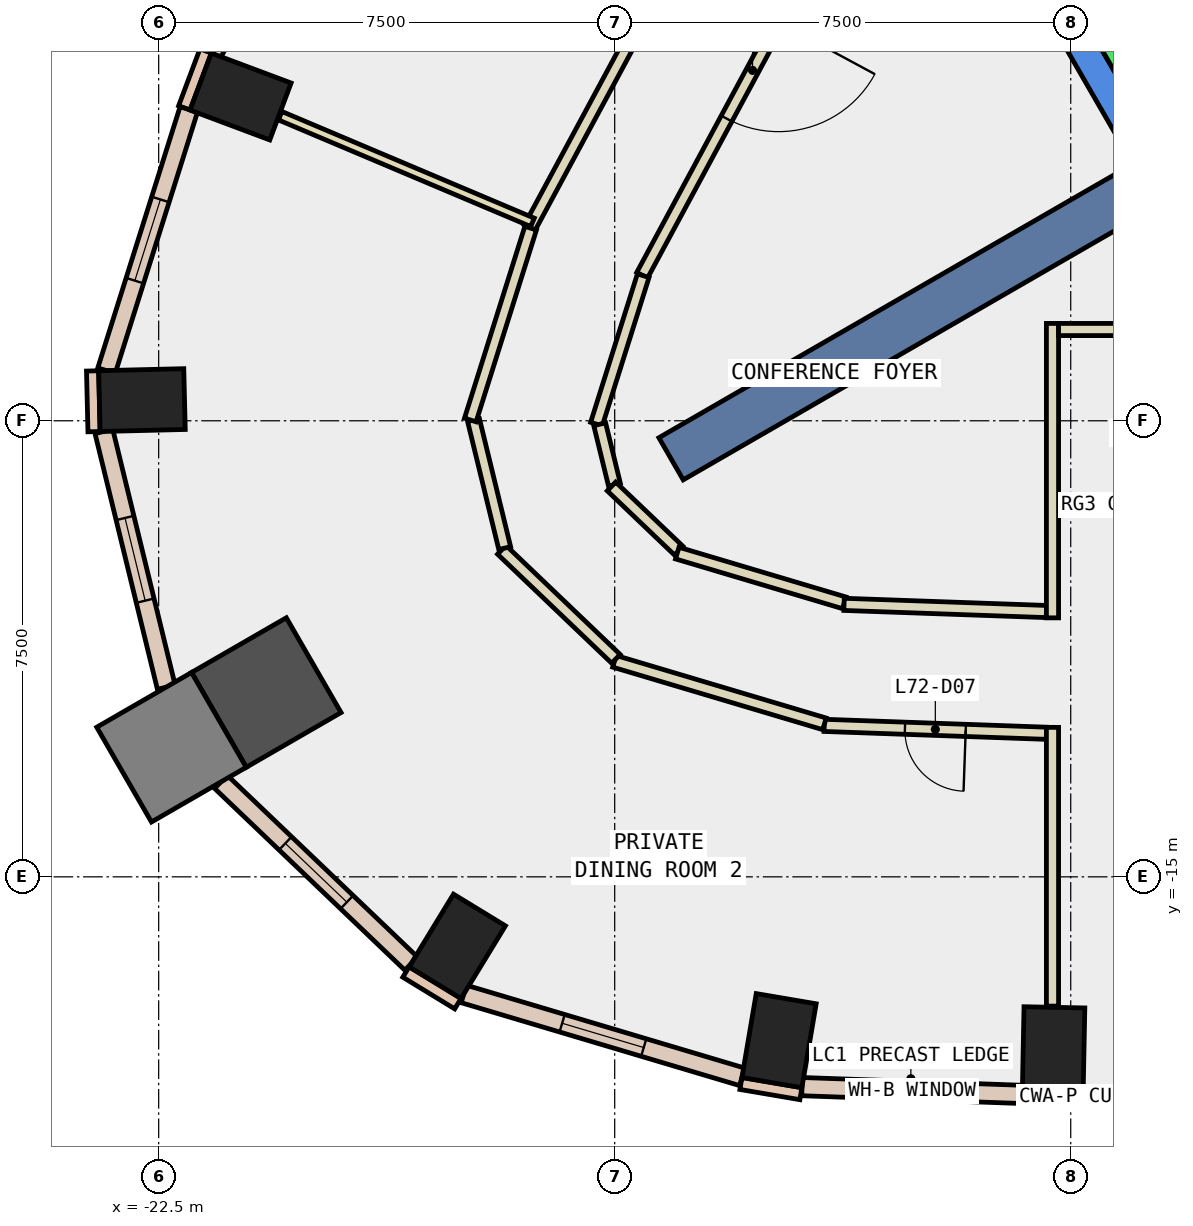
"""IFC4 building model, lengths in metres.
Left out: names, types, materials, properties, quantities, classifications, styles, units other than length and angle.
Written with IfcOpenShell. Run it as: python <this file> out.ifc"""

import sys

from ifc_helpers import new_model, si_unit, direction, frame, frame_2d, origin, origin_2d, place, context, subcontext, project, spatial, polyline, rectangle, outline, extrude, element, fill, save


model = new_model("IFC4")
c1 = context("Model", 3, precision=1e-05, world=origin(), true_north=direction((0.0, 1.0)))
c2 = subcontext(c1, "Body", "Model", "MODEL_VIEW")
j1 = project(units=[si_unit("LENGTHUNIT", "METRE"), si_unit("PLANEANGLEUNIT", "RADIAN")], contexts=[c1])
p1 = place(None, origin())
s1 = spatial("IfcSite", under=j1, at=p1, CompositionType="ELEMENT")
p2 = place(p1, origin())
s2 = spatial("IfcBuilding", under=s1, at=p2, CompositionType="ELEMENT")
p3 = place(p2, frame((0.0, 0.0, 308.0)))
s3 = spatial("IfcBuildingStorey", under=s2, at=p3, CompositionType="ELEMENT", Elevation=308.0)
for number, where, z_axis, x_axis in (
    (1, (-12.297, -17.694, -0.34), (0.0, 0.0, 1.0), (-0.986, 0.168, 0.0)),
    (2, (-7.782, -17.846, -0.34), (0.0, 0.0, 1.0), (-1.0, 0.02, 0.0)),
    (3, (-21.153, -2.168, -0.34), (0.0, 0.0, 1.0), (0.351, 0.936, 0.0)),
    (4, (-22.775, -7.16, -0.34), (0.0, 0.0, 1.0), (-0.024, 1.0, 0.0)),
):
    element("IfcColumn", number, at=place(p3, frame(where, z_axis=z_axis, x_axis=x_axis)), inside=s3, PredefinedType="COLUMN", context=c2, shape_type="SweptSolid", body=[
        extrude(rectangle(XDim=1.0, YDim=1.4, at=origin_2d()), origin(), (0.0, 0.0, 1.0), 3.6),
    ])
p4 = place(p3, frame((-20.73, -11.969, -0.34), z_axis=(0.0, 0.0, 1.0), x_axis=(0.866025403784, 0.5, 0.0)))
e5 = element("IfcColumn", 5, at=p4, inside=s3, PredefinedType="COLUMN", context=c2, shape_type="SweptSolid", body=[
    extrude(rectangle(XDim=1.8, YDim=1.8, at=origin_2d()), origin(), (0.0, 0.0, 1.0), 3.6),
])
p5 = place(p3, frame((-17.589, -16.143, -0.34), z_axis=(0.0, 0.0, 1.0), x_axis=(-0.853650808213, 0.520845752251, 0.0)))
e6 = element("IfcColumn", 6, at=p5, inside=s3, PredefinedType="COLUMN", context=c2, shape_type="SweptSolid", body=[
    extrude(rectangle(XDim=1.0, YDim=1.4, at=origin_2d()), origin(), (0.0, 0.0, 1.0), 3.6),
])
p6 = place(p3, frame((-22.289, -12.869, -0.34), z_axis=(0.0, 0.0, 1.0), x_axis=(0.866025403784, 0.5, 0.0)))
e7 = element("IfcColumn", 7, at=p6, inside=s3, PredefinedType="COLUMN", context=c2, shape_type="SweptSolid", body=[
    extrude(rectangle(XDim=1.8, YDim=1.8, at=origin_2d()), origin(), (0.0, 0.0, 1.0), 3.6),
])
p7 = place(p3, frame((0.0, 0.0, -0.34)))
e8 = element("IfcWall", 8, at=p7, inside=s3, PredefinedType="SHEAR", context=c2, shape_type="SweptSolid", body=[
    extrude(outline(polyline([(-9.815, 2.5), (-4.907, -6.0), (-4.619, -5.5), (-9.238, 2.5), (-9.815, 2.5)])), origin(), (0.0, 0.0, 1.0), 3.6),
])
p8 = place(p3, frame((-6.279, -3.625, -0.34), z_axis=(0.0, 0.0, 1.0), x_axis=(-0.866017533419, -0.500013631625, 0.0)))
e9 = element("IfcWall", 9, at=p8, inside=s3, PredefinedType="SHEAR", context=c2, shape_type="SweptSolid", body=[
    extrude(rectangle(XDim=9.0, YDim=0.8, at=frame_2d((4.5, 0.0))), origin(), (0.0, 0.0, 1.0), 3.6),
])
p9 = place(p3, frame((-21.727, -1.419, 0.0), z_axis=(0.0, 0.0, 1.0), x_axis=(-0.350962844851, -0.936389385637, 0.0)))
e10 = element("IfcWall", 10, at=p9, inside=s3, PredefinedType="STANDARD", context=c2, shape_type="SweptSolid", body=[
    extrude(rectangle(XDim=1.0, YDim=0.2, at=frame_2d((0.5, 0.0))), origin(), (0.0, 0.0, 1.0), 3.26),
])
for number, where, z_axis, x_axis in (
    (11, (-12.924, -18.398, 0.0), (0.0, 0.0, 1.0), (0.986, -0.168, 0.0)),
    (12, (-8.298, -18.636, 0.0), (0.0, 0.0, 1.0), (1.0, -0.02, 0.0)),
):
    element("IfcWall", number, at=place(p3, frame(where, z_axis=z_axis, x_axis=x_axis)), inside=s3, PredefinedType="STANDARD", context=c2, shape_type="SweptSolid", body=[
        extrude(rectangle(XDim=1.0, YDim=0.2, at=frame_2d((0.5, 0.0))), origin(), (0.0, 0.0, 1.0), 3.26),
    ])
p10 = place(p3, frame((-23.587, -6.68, 0.0), z_axis=(0.0, 0.0, 1.0), x_axis=(0.023942303888, -0.999713341956, 0.0)))
e13 = element("IfcWall", 13, at=p10, inside=s3, PredefinedType="STANDARD", context=c2, shape_type="SweptSolid", body=[
    extrude(rectangle(XDim=0.999, YDim=0.2, at=frame_2d((0.5, 0.0))), origin(), (0.0, 0.0, 1.0), 3.26),
])
p11 = place(p3, frame((-18.433, -16.565, 0.0), z_axis=(0.0, 0.0, 1.0), x_axis=(0.853679739553, -0.520798331677, 0.0)))
e14 = element("IfcWall", 14, at=p11, inside=s3, PredefinedType="STANDARD", context=c2, shape_type="SweptSolid", body=[
    extrude(rectangle(XDim=1.0, YDim=0.2, at=frame_2d((0.5, 0.0))), origin(), (0.0, 0.0, 1.0), 3.26),
])
p12 = place(p3, frame((-11.919, -18.45, 0.0), z_axis=(0.0, 0.0, 1.0), x_axis=(0.999377185233, -0.035287981473, 0.0)))
e15 = element("IfcWall", 15, at=p12, inside=s3, PredefinedType="STANDARD", context=c2, shape_type="SweptSolid", body=[
    extrude(rectangle(XDim=3.625, YDim=0.3, at=frame_2d((1.812, 0.0))), origin(), (0.0, 0.0, 1.0), 3.26),
])
p13 = place(p12, frame((1.113, 0.0, 0.9)))
e16 = element("IfcOpeningElement", 16, at=p13, cuts=e15, PredefinedType="OPENING", context=c2, shape_type="SweptSolid", body=[
    extrude(rectangle(XDim=1.4, YDim=2.0, at=frame_2d((0.7, 1.0))), frame((0.0, 0.16, 0.0), z_axis=(0.0, -1.0, 0.0), x_axis=(1.0, 0.0, 0.0)), (0.0, 0.0, 1.0), 0.32),
])
p14 = place(p3, frame((-18.097, 5.066, 0.0), z_axis=(0.0, 0.0, 1.0), x_axis=(-0.474421773145, -0.880297666228, 0.0)))
e17 = element("IfcWall", 17, at=p14, inside=s3, PredefinedType="STANDARD", context=c2, shape_type="SweptSolid", body=[
    extrude(rectangle(XDim=7.416, YDim=0.3, at=frame_2d((3.708, 0.0))), origin(), (0.0, 0.0, 1.0), 3.26),
])
p15 = place(p14, frame((0.754, 0.0, 0.9)))
e18 = element("IfcOpeningElement", 18, at=p15, cuts=e17, PredefinedType="OPENING", context=c2, shape_type="SweptSolid", body=[
    extrude(rectangle(XDim=2.2, YDim=2.0, at=frame_2d((1.1, 1.0))), frame((0.0, 0.16, 0.0), z_axis=(0.0, -1.0, 0.0), x_axis=(1.0, 0.0, 0.0)), (0.0, 0.0, 1.0), 0.32),
])
p16 = place(p14, frame((4.462, 0.0, 0.9)))
e19 = element("IfcOpeningElement", 19, at=p16, cuts=e17, PredefinedType="OPENING", context=c2, shape_type="SweptSolid", body=[
    extrude(rectangle(XDim=2.2, YDim=2.0, at=frame_2d((1.1, 1.0))), frame((0.0, 0.16, 0.0), z_axis=(0.0, -1.0, 0.0), x_axis=(1.0, 0.0, 0.0)), (0.0, 0.0, 1.0), 0.32),
])
p17 = place(p3, frame((-22.005, -2.381, 0.0), z_axis=(0.0, 0.0, 1.0), x_axis=(-0.300534385574, -0.953770980418, 0.0)))
e20 = element("IfcWall", 20, at=p17, inside=s3, PredefinedType="STANDARD", context=c2, shape_type="SweptSolid", body=[
    extrude(rectangle(XDim=4.502, YDim=0.3, at=frame_2d((2.251, 0.0))), origin(), (0.0, 0.0, 1.0), 3.26),
])
p18 = place(p17, frame((1.551, 0.0, 0.9)))
e21 = element("IfcOpeningElement", 21, at=p18, cuts=e20, PredefinedType="OPENING", context=c2, shape_type="SweptSolid", body=[
    extrude(rectangle(XDim=1.4, YDim=2.0, at=frame_2d((0.7, 1.0))), frame((0.0, 0.16, 0.0), z_axis=(0.0, -1.0, 0.0), x_axis=(1.0, 0.0, 0.0)), (0.0, 0.0, 1.0), 0.32),
])
p19 = place(p3, frame((-23.401, -7.675, 0.0), z_axis=(0.0, 0.0, 1.0), x_axis=(0.236958776561, -0.971519705519, 0.0)))
e22 = element("IfcWall", 22, at=p19, inside=s3, PredefinedType="STANDARD", context=c2, shape_type="SweptSolid", body=[
    extrude(rectangle(XDim=4.329, YDim=0.3, at=frame_2d((2.165, 0.0))), origin(), (0.0, 0.0, 1.0), 3.26),
])
p20 = place(p19, frame((1.465, 0.0, 0.9)))
e23 = element("IfcOpeningElement", 23, at=p20, cuts=e22, PredefinedType="OPENING", context=c2, shape_type="SweptSolid", body=[
    extrude(rectangle(XDim=1.4, YDim=2.0, at=frame_2d((0.7, 1.0))), frame((0.0, 0.16, 0.0), z_axis=(0.0, -1.0, 0.0), x_axis=(1.0, 0.0, 0.0)), (0.0, 0.0, 1.0), 0.32),
])
p21 = place(p3, frame((-21.476, -13.438, 0.0), z_axis=(0.0, 0.0, 1.0), x_axis=(0.723113419412, -0.690729312152, 0.0)))
e24 = element("IfcWall", 24, at=p21, inside=s3, PredefinedType="STANDARD", context=c2, shape_type="SweptSolid", body=[
    extrude(rectangle(XDim=4.327, YDim=0.3, at=frame_2d((2.164, 0.0))), origin(), (0.0, 0.0, 1.0), 3.26),
])
p22 = place(p21, frame((1.464, 0.0, 0.9)))
e25 = element("IfcOpeningElement", 25, at=p22, cuts=e24, PredefinedType="OPENING", context=c2, shape_type="SweptSolid", body=[
    extrude(rectangle(XDim=1.4, YDim=2.0, at=frame_2d((0.7, 1.0))), frame((0.0, 0.16, 0.0), z_axis=(0.0, -1.0, 0.0), x_axis=(1.0, 0.0, 0.0)), (0.0, 0.0, 1.0), 0.32),
])
p23 = place(p3, frame((-17.482, -16.926, 0.0), z_axis=(0.0, 0.0, 1.0), x_axis=(0.95841929886, -0.285363711031, 0.0)))
e26 = element("IfcWall", 26, at=p23, inside=s3, PredefinedType="STANDARD", context=c2, shape_type="SweptSolid", body=[
    extrude(rectangle(XDim=4.777, YDim=0.3, at=frame_2d((2.388, 0.0))), origin(), (0.0, 0.0, 1.0), 3.26),
])
p24 = place(p23, frame((1.688, 0.0, 0.9)))
e27 = element("IfcOpeningElement", 27, at=p24, cuts=e26, PredefinedType="OPENING", context=c2, shape_type="SweptSolid", body=[
    extrude(rectangle(XDim=1.4, YDim=2.0, at=frame_2d((0.7, 1.0))), frame((0.0, 0.16, 0.0), z_axis=(0.0, -1.0, 0.0), x_axis=(1.0, 0.0, 0.0)), (0.0, 0.0, 1.0), 0.32),
])
p25 = place(p3, frame((-10.917, 1.631, 0.0), z_axis=(0.0, 0.0, 1.0), x_axis=(-0.47449538478, -0.880257990491, 0.0)))
e28 = element("IfcWall", 28, at=p25, inside=s3, PredefinedType="PARTITIONING", context=c2, shape_type="SweptSolid", body=[
    extrude(rectangle(XDim=7.655, YDim=0.2, at=frame_2d((3.827, 0.0))), origin(), (0.0, 0.0, 1.0), 3.26),
])
p26 = place(p25, frame((2.927, 0.0, 0.0)))
e29 = element("IfcOpeningElement", 29, at=p26, cuts=e28, PredefinedType="OPENING", context=c2, shape_type="SweptSolid", body=[
    extrude(rectangle(XDim=1.8, YDim=2.1, at=frame_2d((0.9, 1.05))), frame((0.0, 0.11, 0.0), z_axis=(0.0, -1.0, 0.0), x_axis=(1.0, 0.0, 0.0)), (0.0, 0.0, 1.0), 0.22),
])
p27 = place(p3, frame((-14.531, -5.114, 0.0), z_axis=(0.0, 0.0, 1.0), x_axis=(-0.300501248013, -0.953781421471, 0.0)))
e30 = element("IfcWall", 30, at=p27, inside=s3, PredefinedType="PARTITIONING", context=c2, shape_type="SweptSolid", body=[
    extrude(rectangle(XDim=2.559, YDim=0.2, at=frame_2d((1.28, 0.0))), origin(), (0.0, 0.0, 1.0), 3.26),
])
p28 = place(p3, frame((-15.247, -7.557, 0.0), z_axis=(0.0, 0.0, 1.0), x_axis=(0.237373129266, -0.971418549083, 0.0)))
e31 = element("IfcWall", 31, at=p28, inside=s3, PredefinedType="PARTITIONING", context=c2, shape_type="SweptSolid", body=[
    extrude(rectangle(XDim=1.024, YDim=0.2, at=frame_2d((0.512, 0.0))), origin(), (0.0, 0.0, 1.0), 3.26),
])
p29 = place(p3, frame((-15.053, -8.58, 0.0), z_axis=(0.0, 0.0, 1.0), x_axis=(0.723283043556, -0.690551691696, 0.0)))
e32 = element("IfcWall", 32, at=p29, inside=s3, PredefinedType="PARTITIONING", context=c2, shape_type="SweptSolid", body=[
    extrude(rectangle(XDim=1.529, YDim=0.2, at=frame_2d((0.765, 0.0))), origin(), (0.0, 0.0, 1.0), 3.26),
])
p30 = place(p3, frame((-13.971, -9.676, 0.0), z_axis=(0.0, 0.0, 1.0), x_axis=(0.958417413979, -0.285370041492, 0.0)))
e33 = element("IfcWall", 33, at=p30, inside=s3, PredefinedType="PARTITIONING", context=c2, shape_type="SweptSolid", body=[
    extrude(rectangle(XDim=2.866, YDim=0.2, at=frame_2d((1.433, 0.0))), origin(), (0.0, 0.0, 1.0), 3.26),
])
p31 = place(p3, frame((-11.228, -10.519, 0.0), z_axis=(0.0, 0.0, 1.0), x_axis=(0.999372900517, -0.035409119054, 0.0)))
e34 = element("IfcWall", 34, at=p31, inside=s3, PredefinedType="PARTITIONING", context=c2, shape_type="SweptSolid", body=[
    extrude(rectangle(XDim=3.33, YDim=0.2, at=frame_2d((1.665, 0.0))), origin(), (0.0, 0.0, 1.0), 3.26),
])
p32 = place(p3, frame((-16.399, -4.325, 0.0), z_axis=(0.0, 0.0, 1.0), x_axis=(0.474489967676, 0.880260910512, 0.0)))
e35 = element("IfcWall", 35, at=p32, inside=s3, PredefinedType="PARTITIONING", context=c2, shape_type="SweptSolid", body=[
    extrude(rectangle(XDim=7.948, YDim=0.2, at=frame_2d((3.974, 0.0))), origin(), (0.0, 0.0, 1.0), 3.26),
])
p33 = place(p32, frame((3.474, 0.0, 0.0)))
e36 = element("IfcOpeningElement", 36, at=p33, cuts=e35, PredefinedType="OPENING", context=c2, shape_type="SweptSolid", body=[
    extrude(rectangle(XDim=1.0, YDim=2.1, at=frame_2d((0.5, 1.05))), frame((0.0, 0.11, 0.0), z_axis=(0.0, -1.0, 0.0), x_axis=(1.0, 0.0, 0.0)), (0.0, 0.0, 1.0), 0.22),
])
p34 = place(p3, frame((-7.9, -12.639, 0.0), z_axis=(0.0, 0.0, 1.0), x_axis=(-0.999368879246, 0.035522432268, 0.0)))
e37 = element("IfcWall", 37, at=p34, inside=s3, PredefinedType="PARTITIONING", context=c2, shape_type="SweptSolid", body=[
    extrude(rectangle(XDim=3.656, YDim=0.2, at=frame_2d((1.828, 0.0))), origin(), (0.0, 0.0, 1.0), 3.26),
])
p35 = place(p34, frame((1.328, 0.0, 0.0)))
e38 = element("IfcOpeningElement", 38, at=p35, cuts=e37, PredefinedType="OPENING", context=c2, shape_type="SweptSolid", body=[
    extrude(rectangle(XDim=1.0, YDim=2.1, at=frame_2d((0.5, 1.05))), frame((0.0, 0.11, 0.0), z_axis=(0.0, -1.0, 0.0), x_axis=(1.0, 0.0, 0.0)), (0.0, 0.0, 1.0), 0.22),
])
p36 = place(p3, frame((-11.55, -12.484, 0.0), z_axis=(0.0, 0.0, 1.0), x_axis=(-0.958459796003, 0.285227662485, 0.0)))
e39 = element("IfcWall", 39, at=p36, inside=s3, PredefinedType="PARTITIONING", context=c2, shape_type="SweptSolid", body=[
    extrude(rectangle(XDim=3.604, YDim=0.2, at=frame_2d((1.802, 0.0))), origin(), (0.0, 0.0, 1.0), 3.26),
])
p37 = place(p3, frame((-14.98, -11.415, 0.0), z_axis=(0.0, 0.0, 1.0), x_axis=(-0.723099256445, 0.690744138831, 0.0)))
e40 = element("IfcWall", 40, at=p37, inside=s3, PredefinedType="PARTITIONING", context=c2, shape_type="SweptSolid", body=[
    extrude(rectangle(XDim=2.596, YDim=0.2, at=frame_2d((1.298, 0.0))), origin(), (0.0, 0.0, 1.0), 3.26),
])
p38 = place(p3, frame((-16.809, -9.594, 0.0), z_axis=(0.0, 0.0, 1.0), x_axis=(-0.23664760587, 0.971595548897, 0.0)))
e41 = element("IfcWall", 41, at=p38, inside=s3, PredefinedType="PARTITIONING", context=c2, shape_type="SweptSolid", body=[
    extrude(rectangle(XDim=2.167, YDim=0.2, at=frame_2d((1.084, 0.0))), origin(), (0.0, 0.0, 1.0), 3.26),
])
p39 = place(p3, frame((-17.375, -7.487, 0.0), z_axis=(0.0, 0.0, 1.0), x_axis=(0.300195088058, 0.953877827138, 0.0)))
e42 = element("IfcWall", 42, at=p39, inside=s3, PredefinedType="PARTITIONING", context=c2, shape_type="SweptSolid", body=[
    extrude(rectangle(XDim=3.308, YDim=0.2, at=frame_2d((1.654, 0.0))), origin(), (0.0, 0.0, 1.0), 3.26),
])
p40 = place(p3, frame((-7.8, -10.741, 0.0), z_axis=(0.0, 0.0, 1.0), x_axis=(0.0, 1.0, 0.0)))
e43 = element("IfcWall", 43, at=p40, inside=s3, PredefinedType="PARTITIONING", context=c2, shape_type="SweptSolid", body=[
    extrude(rectangle(XDim=4.842, YDim=0.2, at=frame_2d((2.421, 0.0))), origin(), (0.0, 0.0, 1.0), 3.26),
])
p41 = place(p3, frame((-7.7, -5.999, 0.0), z_axis=(0.0, 0.0, 1.0), x_axis=(1.0, 0.0, 0.0)))
e44 = element("IfcWall", 44, at=p41, inside=s3, PredefinedType="PARTITIONING", context=c2, shape_type="SweptSolid", body=[
    extrude(rectangle(XDim=2.792, YDim=0.2, at=frame_2d((1.396, 0.0))), origin(), (0.0, 0.0, 1.0), 3.26),
])
p42 = place(p3, frame((-7.8, -17.126, 0.0), z_axis=(0.0, 0.0, 1.0), x_axis=(0.0, 1.0, 0.0)))
e45 = element("IfcWall", 45, at=p42, inside=s3, PredefinedType="PARTITIONING", context=c2, shape_type="SweptSolid", body=[
    extrude(rectangle(XDim=4.584, YDim=0.2, at=frame_2d((2.292, 0.0))), origin(), (0.0, 0.0, 1.0), 3.26),
])
p43 = place(p3, frame((-16.352, -4.237, 0.0), z_axis=(0.0, 0.0, 1.0), x_axis=(-0.921092849348, 0.389342988738, 0.0)))
e46 = element("IfcWall", 46, at=p43, inside=s3, PredefinedType="PARTITIONING", context=c2, shape_type="SweptSolid", body=[
    extrude(rectangle(XDim=4.505, YDim=0.15, at=frame_2d((2.253, 0.0))), origin(), (0.0, 0.0, 1.0), 3.26),
])
p44 = place(p3, frame((-8.192, 0.888, 0.0), z_axis=(0.0, 0.0, 1.0), x_axis=(0.500034260056, -0.866005622828, 0.0)))
e47 = element("IfcWall", 47, at=p44, inside=s3, PredefinedType="STANDARD", context=c2, shape_type="SweptSolid", body=[
    extrude(rectangle(XDim=5.399, YDim=0.2, at=frame_2d((2.7, 0.0))), origin(), (0.0, 0.0, 1.0), 3.26),
])
p45 = place(p3, frame((-4.677, -0.2, 0.0), z_axis=(0.0, 0.0, 1.0), x_axis=(-0.865973769406, -0.500089422704, 0.0)))
e48 = element("IfcWall", 48, at=p45, inside=s3, PredefinedType="STANDARD", context=c2, shape_type="SweptSolid", body=[
    extrude(rectangle(XDim=2.399, YDim=0.2, at=frame_2d((1.2, 0.0))), origin(), (0.0, 0.0, 1.0), 3.26),
])
p46 = place(p13, origin())
e49 = element("IfcWindow", 49, at=p46, inside=s3, PartitioningType="SINGLE_PANEL", PredefinedType="WINDOW", context=c2, shape_type="SweptSolid", body=[
    extrude(rectangle(XDim=1.4, YDim=2.0, at=frame_2d((0.7, 1.0))), frame((0.0, 0.03, 0.0), z_axis=(0.0, -1.0, 0.0), x_axis=(1.0, 0.0, 0.0)), (0.0, 0.0, 1.0), 0.06),
])
fill(e16, e49)
p47 = place(p18, origin())
e50 = element("IfcWindow", 50, at=p47, inside=s3, PartitioningType="SINGLE_PANEL", PredefinedType="WINDOW", context=c2, shape_type="SweptSolid", body=[
    extrude(rectangle(XDim=1.4, YDim=2.0, at=frame_2d((0.7, 1.0))), frame((0.0, 0.03, 0.0), z_axis=(0.0, -1.0, 0.0), x_axis=(1.0, 0.0, 0.0)), (0.0, 0.0, 1.0), 0.06),
])
fill(e21, e50)
p48 = place(p20, origin())
e51 = element("IfcWindow", 51, at=p48, inside=s3, PartitioningType="SINGLE_PANEL", PredefinedType="WINDOW", context=c2, shape_type="SweptSolid", body=[
    extrude(rectangle(XDim=1.4, YDim=2.0, at=frame_2d((0.7, 1.0))), frame((0.0, 0.03, 0.0), z_axis=(0.0, -1.0, 0.0), x_axis=(1.0, 0.0, 0.0)), (0.0, 0.0, 1.0), 0.06),
])
fill(e23, e51)
p49 = place(p22, origin())
e52 = element("IfcWindow", 52, at=p49, inside=s3, PartitioningType="SINGLE_PANEL", PredefinedType="WINDOW", context=c2, shape_type="SweptSolid", body=[
    extrude(rectangle(XDim=1.4, YDim=2.0, at=frame_2d((0.7, 1.0))), frame((0.0, 0.03, 0.0), z_axis=(0.0, -1.0, 0.0), x_axis=(1.0, 0.0, 0.0)), (0.0, 0.0, 1.0), 0.06),
])
fill(e25, e52)
p50 = place(p24, origin())
e53 = element("IfcWindow", 53, at=p50, inside=s3, PartitioningType="SINGLE_PANEL", PredefinedType="WINDOW", context=c2, shape_type="SweptSolid", body=[
    extrude(rectangle(XDim=1.4, YDim=2.0, at=frame_2d((0.7, 1.0))), frame((0.0, 0.03, 0.0), z_axis=(0.0, -1.0, 0.0), x_axis=(1.0, 0.0, 0.0)), (0.0, 0.0, 1.0), 0.06),
])
fill(e27, e53)
p51 = place(p35, origin())
e54 = element("IfcDoor", 54, at=p51, inside=s3, OperationType="SINGLE_SWING_LEFT", PredefinedType="DOOR", context=c2, shape_type="SweptSolid", body=[
    extrude(rectangle(XDim=1.0, YDim=2.1, at=frame_2d((0.5, 1.05))), frame((0.0, 0.025, 0.0), z_axis=(0.0, -1.0, 0.0), x_axis=(1.0, 0.0, 0.0)), (0.0, 0.0, 1.0), 0.05),
])
fill(e38, e54)
p52 = place(p26, origin())
e55 = element("IfcDoor", 55, at=p52, inside=s3, OperationType="DOUBLE_DOOR_SINGLE_SWING", PredefinedType="DOOR", context=c2, shape_type="SweptSolid", body=[
    extrude(rectangle(XDim=1.8, YDim=2.1, at=frame_2d((0.9, 1.05))), frame((0.0, 0.025, 0.0), z_axis=(0.0, -1.0, 0.0), x_axis=(1.0, 0.0, 0.0)), (0.0, 0.0, 1.0), 0.05),
])
fill(e29, e55)
save(model, sys.argv[1])
